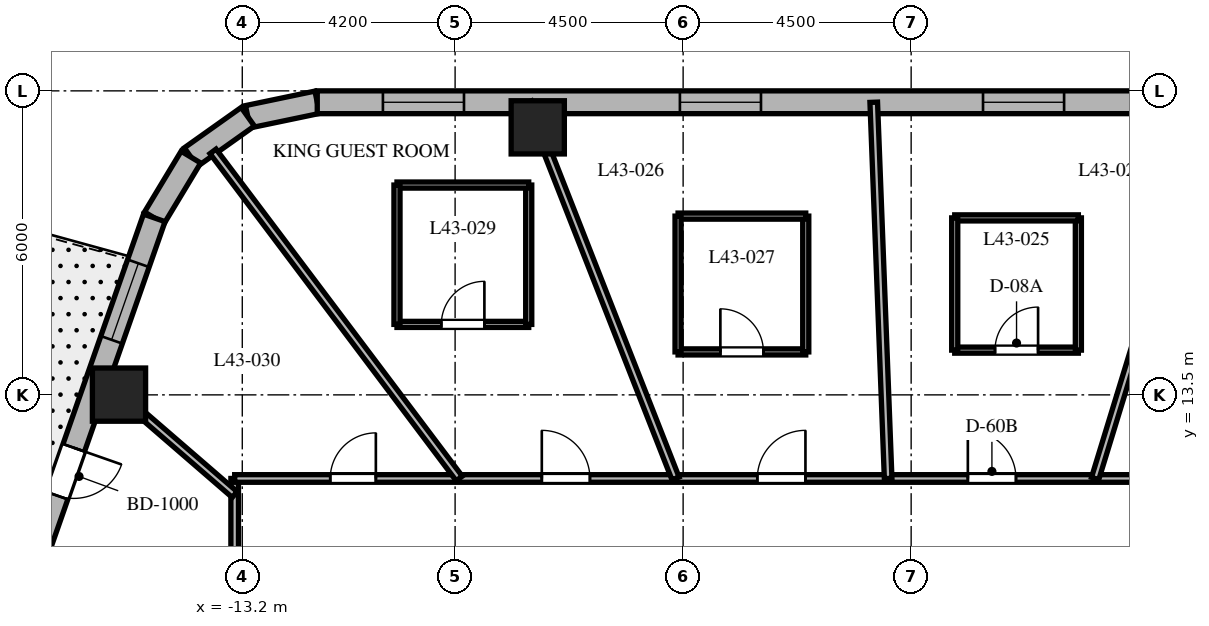
"""IFC4 building model, lengths in metres.
Left out: names, types, materials, properties, quantities, classifications, styles, units other than length and angle.
Written with IfcOpenShell. Run it as: python <this file> out.ifc"""

import sys

from ifc_helpers import new_model, si_unit, direction, frame, frame_2d, origin, origin_2d, place, context, subcontext, project, spatial, rectangle, extrude, element, fill, save


model = new_model("IFC4")
c1 = context("Model", 3, precision=1e-05, world=origin(), true_north=direction((0.0, 1.0)))
c2 = subcontext(c1, "Body", "Model", "MODEL_VIEW")
j1 = project(units=[si_unit("LENGTHUNIT", "METRE"), si_unit("PLANEANGLEUNIT", "RADIAN")], contexts=[c1])
p1 = place(None, origin())
s1 = spatial("IfcSite", under=j1, at=p1, CompositionType="ELEMENT")
p2 = place(p1, origin())
s2 = spatial("IfcBuilding", under=s1, at=p2, CompositionType="ELEMENT")
p3 = place(p2, frame((0.0, 0.0, 175.6)))
s3 = spatial("IfcBuildingStorey", under=s2, at=p3, CompositionType="ELEMENT", Elevation=175.6)
for number, where, z_axis, x_axis in (
    (1, (-7.369, 18.78, 0.0), (0.0, 0.0, 1.0), (1.0, 0.0, 0.0)),
    (2, (-15.633, 13.505, 0.0), (0.0, 0.0, 1.0), (1.0, 0.0, 0.0)),
):
    element("IfcColumn", number, at=place(p3, frame(where, z_axis=z_axis, x_axis=x_axis)), inside=s3, PredefinedType="COLUMN", context=c2, shape_type="SweptSolid", body=[
        extrude(rectangle(XDim=1.05, YDim=1.05, at=origin_2d()), origin(), (0.0, 0.0, 1.0), 3.7),
    ])
p4 = place(p3, frame((-11.72, 19.275, 0.0), z_axis=(0.0, 0.0, 1.0), x_axis=(-0.97893106758, -0.204191001093, 0.0)))
e3 = element("IfcWall", 3, at=p4, inside=s3, PredefinedType="SOLIDWALL", context=c2, shape_type="SweptSolid", body=[
    extrude(rectangle(XDim=1.4, YDim=0.45, at=frame_2d((0.7, 0.0))), origin(), (0.0, 0.0, 1.0), 3.4),
])
p5 = place(p3, frame((-13.091, 18.989, 0.0), z_axis=(0.0, 0.0, 1.0), x_axis=(-0.815574637848, -0.578651890258, 0.0)))
e4 = element("IfcWall", 4, at=p5, inside=s3, PredefinedType="SOLIDWALL", context=c2, shape_type="SweptSolid", body=[
    extrude(rectangle(XDim=1.377, YDim=0.45, at=frame_2d((0.688, 0.0))), origin(), (0.0, 0.0, 1.0), 3.4),
])
p6 = place(p3, frame((-14.214, 18.192, 0.0), z_axis=(0.0, 0.0, 1.0), x_axis=(-0.516340945502, -0.856383108193, 0.0)))
e5 = element("IfcWall", 5, at=p6, inside=s3, PredefinedType="SOLIDWALL", context=c2, shape_type="SweptSolid", body=[
    extrude(rectangle(XDim=1.4, YDim=0.45, at=frame_2d((0.7, 0.0))), origin(), (0.0, 0.0, 1.0), 3.4),
])
p7 = place(p3, frame((10.108, 19.275, 0.0), z_axis=(0.0, 0.0, 1.0), x_axis=(-1.0, 0.0, 0.0)))
e6 = element("IfcWall", 6, at=p7, inside=s3, PredefinedType="SOLIDWALL", context=c2, shape_type="SweptSolid", body=[
    extrude(rectangle(XDim=21.829, YDim=0.45, at=frame_2d((10.915, 0.0))), origin(), (0.0, 0.0, 1.0), 3.4),
])
p8 = place(p7, frame((1.297, 0.0, 0.8)))
e7 = element("IfcOpeningElement", 7, at=p8, cuts=e6, PredefinedType="OPENING", context=c2, shape_type="SweptSolid", body=[
    extrude(rectangle(XDim=1.6, YDim=1.75, at=frame_2d((0.8, 0.875))), frame((0.0, 0.235, 0.0), z_axis=(0.0, -1.0, 0.0), x_axis=(1.0, 0.0, 0.0)), (0.0, 0.0, 1.0), 0.47),
])
p9 = place(p7, frame((7.09, 0.0, 0.8)))
e8 = element("IfcOpeningElement", 8, at=p9, cuts=e6, PredefinedType="OPENING", context=c2, shape_type="SweptSolid", body=[
    extrude(rectangle(XDim=1.6, YDim=1.75, at=frame_2d((0.8, 0.875))), frame((0.0, 0.235, 0.0), z_axis=(0.0, -1.0, 0.0), x_axis=(1.0, 0.0, 0.0)), (0.0, 0.0, 1.0), 0.47),
])
p10 = place(p7, frame((13.072, 0.0, 0.8)))
e9 = element("IfcOpeningElement", 9, at=p10, cuts=e6, PredefinedType="OPENING", context=c2, shape_type="SweptSolid", body=[
    extrude(rectangle(XDim=1.6, YDim=1.75, at=frame_2d((0.8, 0.875))), frame((0.0, 0.235, 0.0), z_axis=(0.0, -1.0, 0.0), x_axis=(1.0, 0.0, 0.0)), (0.0, 0.0, 1.0), 0.47),
])
p11 = place(p7, frame((18.933, 0.0, 0.8)))
e10 = element("IfcOpeningElement", 10, at=p11, cuts=e6, PredefinedType="OPENING", context=c2, shape_type="SweptSolid", body=[
    extrude(rectangle(XDim=1.6, YDim=1.75, at=frame_2d((0.8, 0.875))), frame((0.0, 0.235, 0.0), z_axis=(0.0, -1.0, 0.0), x_axis=(1.0, 0.0, 0.0)), (0.0, 0.0, 1.0), 0.47),
])
p12 = place(p3, frame((-14.937, 16.993, 0.0), z_axis=(0.0, 0.0, 1.0), x_axis=(-0.330431575061, -0.943829949834, 0.0)))
e11 = element("IfcWall", 11, at=p12, inside=s3, PredefinedType="SOLIDWALL", context=c2, shape_type="SweptSolid", body=[
    extrude(rectangle(XDim=17.689, YDim=0.45, at=frame_2d((8.844, 0.0))), origin(), (0.0, 0.0, 1.0), 3.4),
])
p13 = place(p12, frame((4.807, 0.0, 0.0)))
e12 = element("IfcOpeningElement", 12, at=p13, cuts=e11, PredefinedType="OPENING", context=c2, shape_type="SweptSolid", body=[
    extrude(rectangle(XDim=1.0, YDim=2.15, at=frame_2d((0.5, 1.075))), frame((0.0, 0.235, 0.0), z_axis=(0.0, -1.0, 0.0), x_axis=(1.0, 0.0, 0.0)), (0.0, 0.0, 1.0), 0.47),
])
p14 = place(p12, frame((0.95, 0.0, 0.8)))
e13 = element("IfcOpeningElement", 13, at=p14, cuts=e11, PredefinedType="OPENING", context=c2, shape_type="SweptSolid", body=[
    extrude(rectangle(XDim=1.6, YDim=1.75, at=frame_2d((0.8, 0.875))), frame((0.0, 0.235, 0.0), z_axis=(0.0, -1.0, 0.0), x_axis=(1.0, 0.0, 0.0)), (0.0, 0.0, 1.0), 0.47),
])
p15 = place(p12, frame((7.99, 0.0, 0.8)))
e14 = element("IfcOpeningElement", 14, at=p15, cuts=e11, PredefinedType="OPENING", context=c2, shape_type="SweptSolid", body=[
    extrude(rectangle(XDim=1.6, YDim=1.75, at=frame_2d((0.8, 0.875))), frame((0.0, 0.235, 0.0), z_axis=(0.0, -1.0, 0.0), x_axis=(1.0, 0.0, 0.0)), (0.0, 0.0, 1.0), 0.47),
])
p16 = place(p12, frame((15.084, 0.0, 0.8)))
e15 = element("IfcOpeningElement", 15, at=p16, cuts=e11, PredefinedType="OPENING", context=c2, shape_type="SweptSolid", body=[
    extrude(rectangle(XDim=1.6, YDim=1.75, at=frame_2d((0.8, 0.875))), frame((0.0, 0.235, 0.0), z_axis=(0.0, -1.0, 0.0), x_axis=(1.0, 0.0, 0.0)), (0.0, 0.0, 1.0), 0.47),
])
p17 = place(p3, frame((-13.35, -11.85, 0.0), z_axis=(0.0, 0.0, 1.0), x_axis=(0.0, 1.0, 0.0)))
e16 = element("IfcWall", 16, at=p17, inside=s3, PredefinedType="PARTITIONING", context=c2, shape_type="SweptSolid", body=[
    extrude(rectangle(XDim=23.7, YDim=0.15, at=frame_2d((11.85, 0.0))), origin(), (0.0, 0.0, 1.0), 2.84),
])
p18 = place(p17, frame((18.389, 0.0, 0.0)))
e17 = element("IfcOpeningElement", 17, at=p18, cuts=e16, PredefinedType="OPENING", context=c2, shape_type="SweptSolid", body=[
    extrude(rectangle(XDim=0.95, YDim=2.03, at=frame_2d((0.475, 1.015))), frame((0.0, 0.085, 0.0), z_axis=(0.0, -1.0, 0.0), x_axis=(1.0, 0.0, 0.0)), (0.0, 0.0, 1.0), 0.17),
])
p19 = place(p17, frame((12.315, 0.0, 0.0)))
e18 = element("IfcOpeningElement", 18, at=p19, cuts=e16, PredefinedType="OPENING", context=c2, shape_type="SweptSolid", body=[
    extrude(rectangle(XDim=0.9, YDim=2.03, at=frame_2d((0.45, 1.015))), frame((0.0, 0.085, 0.0), z_axis=(0.0, -1.0, 0.0), x_axis=(1.0, 0.0, 0.0)), (0.0, 0.0, 1.0), 0.17),
])
p20 = place(p17, frame((9.27, 0.0, 0.0)))
e19 = element("IfcOpeningElement", 19, at=p20, cuts=e16, PredefinedType="OPENING", context=c2, shape_type="SweptSolid", body=[
    extrude(rectangle(XDim=0.9, YDim=2.03, at=frame_2d((0.45, 1.015))), frame((0.0, 0.085, 0.0), z_axis=(0.0, -1.0, 0.0), x_axis=(1.0, 0.0, 0.0)), (0.0, 0.0, 1.0), 0.17),
])
p21 = place(p17, frame((3.765, 0.0, 0.0)))
e20 = element("IfcOpeningElement", 20, at=p21, cuts=e16, PredefinedType="OPENING", context=c2, shape_type="SweptSolid", body=[
    extrude(rectangle(XDim=0.9, YDim=2.03, at=frame_2d((0.45, 1.015))), frame((0.0, 0.085, 0.0), z_axis=(0.0, -1.0, 0.0), x_axis=(1.0, 0.0, 0.0)), (0.0, 0.0, 1.0), 0.17),
])
p22 = place(p3, frame((-13.35, 11.85, 0.0), z_axis=(0.0, 0.0, 1.0), x_axis=(1.0, 0.0, 0.0)))
e21 = element("IfcWall", 21, at=p22, inside=s3, PredefinedType="PARTITIONING", context=c2, shape_type="SweptSolid", body=[
    extrude(rectangle(XDim=26.7, YDim=0.15, at=frame_2d((13.35, 0.0))), origin(), (0.0, 0.0, 1.0), 2.84),
])
p23 = place(p22, frame((22.7, 0.0, 0.0)))
e22 = element("IfcOpeningElement", 22, at=p23, cuts=e21, PredefinedType="OPENING", context=c2, shape_type="SweptSolid", body=[
    extrude(rectangle(XDim=0.9, YDim=2.03, at=frame_2d((0.45, 1.015))), frame((0.0, 0.085, 0.0), z_axis=(0.0, -1.0, 0.0), x_axis=(1.0, 0.0, 0.0)), (0.0, 0.0, 1.0), 0.17),
])
p24 = place(p22, frame((18.523, 0.0, 0.0)))
e23 = element("IfcOpeningElement", 23, at=p24, cuts=e21, PredefinedType="OPENING", context=c2, shape_type="SweptSolid", body=[
    extrude(rectangle(XDim=0.95, YDim=2.03, at=frame_2d((0.475, 1.015))), frame((0.0, 0.085, 0.0), z_axis=(0.0, -1.0, 0.0), x_axis=(1.0, 0.0, 0.0)), (0.0, 0.0, 1.0), 0.17),
])
p25 = place(p22, frame((14.469, 0.0, 0.0)))
e24 = element("IfcOpeningElement", 24, at=p25, cuts=e21, PredefinedType="OPENING", context=c2, shape_type="SweptSolid", body=[
    extrude(rectangle(XDim=0.95, YDim=2.03, at=frame_2d((0.475, 1.015))), frame((0.0, 0.085, 0.0), z_axis=(0.0, -1.0, 0.0), x_axis=(1.0, 0.0, 0.0)), (0.0, 0.0, 1.0), 0.17),
])
p26 = place(p22, frame((10.314, 0.0, 0.0)))
e25 = element("IfcOpeningElement", 25, at=p26, cuts=e21, PredefinedType="OPENING", context=c2, shape_type="SweptSolid", body=[
    extrude(rectangle(XDim=0.95, YDim=2.03, at=frame_2d((0.475, 1.015))), frame((0.0, 0.085, 0.0), z_axis=(0.0, -1.0, 0.0), x_axis=(1.0, 0.0, 0.0)), (0.0, 0.0, 1.0), 0.17),
])
p27 = place(p22, frame((6.061, 0.0, 0.0)))
e26 = element("IfcOpeningElement", 26, at=p27, cuts=e21, PredefinedType="OPENING", context=c2, shape_type="SweptSolid", body=[
    extrude(rectangle(XDim=0.95, YDim=2.03, at=frame_2d((0.475, 1.015))), frame((0.0, 0.085, 0.0), z_axis=(0.0, -1.0, 0.0), x_axis=(1.0, 0.0, 0.0)), (0.0, 0.0, 1.0), 0.17),
])
p28 = place(p22, frame((1.886, 0.0, 0.0)))
e27 = element("IfcOpeningElement", 27, at=p28, cuts=e21, PredefinedType="OPENING", context=c2, shape_type="SweptSolid", body=[
    extrude(rectangle(XDim=0.9, YDim=2.03, at=frame_2d((0.45, 1.015))), frame((0.0, 0.085, 0.0), z_axis=(0.0, -1.0, 0.0), x_axis=(1.0, 0.0, 0.0)), (0.0, 0.0, 1.0), 0.17),
])
p29 = place(p3, frame((3.631, 11.85, 0.0), z_axis=(0.0, 0.0, 1.0), x_axis=(0.293007573338, 0.956110120209, 0.0)))
e28 = element("IfcWall", 28, at=p29, inside=s3, PredefinedType="PARTITIONING", context=c2, shape_type="SweptSolid", body=[
    extrude(rectangle(XDim=7.766, YDim=0.15, at=frame_2d((3.883, 0.0))), origin(), (0.0, 0.0, 1.0), 2.64),
])
p30 = place(p3, frame((-0.454, 11.85, 0.0), z_axis=(0.0, 0.0, 1.0), x_axis=(-0.038279171143, 0.999267083945, 0.0)))
e29 = element("IfcWall", 29, at=p30, inside=s3, PredefinedType="PARTITIONING", context=c2, shape_type="SweptSolid", body=[
    extrude(rectangle(XDim=7.43, YDim=0.15, at=frame_2d((3.715, 0.0))), origin(), (0.0, 0.0, 1.0), 2.64),
])
p31 = place(p3, frame((-4.65, 11.85, 0.0), z_axis=(0.0, 0.0, 1.0), x_axis=(-0.365265947993, 0.930903210456, 0.0)))
e30 = element("IfcWall", 30, at=p31, inside=s3, PredefinedType="PARTITIONING", context=c2, shape_type="SweptSolid", body=[
    extrude(rectangle(XDim=7.976, YDim=0.15, at=frame_2d((3.988, 0.0))), origin(), (0.0, 0.0, 1.0), 2.64),
])
p32 = place(p3, frame((-8.918, 11.85, 0.0), z_axis=(0.0, 0.0, 1.0), x_axis=(-0.601347965064, 0.798987249531, 0.0)))
e31 = element("IfcWall", 31, at=p32, inside=s3, PredefinedType="PARTITIONING", context=c2, shape_type="SweptSolid", body=[
    extrude(rectangle(XDim=8.08, YDim=0.15, at=frame_2d((4.04, 0.0))), origin(), (0.0, 0.0, 1.0), 2.64),
])
p33 = place(p3, frame((-13.35, 11.533, 0.0), z_axis=(0.0, 0.0, 1.0), x_axis=(-0.756711647314, 0.65374879183, 0.0)))
e32 = element("IfcWall", 32, at=p33, inside=s3, PredefinedType="PARTITIONING", context=c2, shape_type="SweptSolid", body=[
    extrude(rectangle(XDim=3.55, YDim=0.15, at=frame_2d((1.775, 0.0))), origin(), (0.0, 0.0, 1.0), 2.64),
])
p34 = place(p3, frame((0.86, 14.383, 0.0), z_axis=(0.0, 0.0, 1.0), x_axis=(1.0, 0.0, 0.0)))
e33 = element("IfcWall", 33, at=p34, inside=s3, PredefinedType="PARTITIONING", context=c2, shape_type="SweptSolid", body=[
    extrude(rectangle(XDim=2.44, YDim=0.12, at=frame_2d((1.22, 0.0))), origin(), (0.0, 0.0, 1.0), 3.4),
])
p35 = place(p34, frame((0.795, 0.0, 0.0)))
e34 = element("IfcOpeningElement", 34, at=p35, cuts=e33, PredefinedType="OPENING", context=c2, shape_type="SweptSolid", body=[
    extrude(rectangle(XDim=0.85, YDim=2.03, at=frame_2d((0.425, 1.015))), frame((0.0, 0.07, 0.0), z_axis=(0.0, -1.0, 0.0), x_axis=(1.0, 0.0, 0.0)), (0.0, 0.0, 1.0), 0.14),
])
p36 = place(p3, frame((3.3, 14.383, 0.0), z_axis=(0.0, 0.0, 1.0), x_axis=(0.0, 1.0, 0.0)))
e35 = element("IfcWall", 35, at=p36, inside=s3, PredefinedType="PARTITIONING", context=c2, shape_type="SweptSolid", body=[
    extrude(rectangle(XDim=2.61, YDim=0.12, at=frame_2d((1.305, 0.0))), origin(), (0.0, 0.0, 1.0), 2.84),
])
p37 = place(p3, frame((3.3, 16.993, 0.0), z_axis=(0.0, 0.0, 1.0), x_axis=(-1.0, 0.0, 0.0)))
e36 = element("IfcWall", 36, at=p37, inside=s3, PredefinedType="PARTITIONING", context=c2, shape_type="SweptSolid", body=[
    extrude(rectangle(XDim=2.44, YDim=0.12, at=frame_2d((1.22, 0.0))), origin(), (0.0, 0.0, 1.0), 3.4),
])
p38 = place(p3, frame((0.86, 16.993, 0.0), z_axis=(0.0, 0.0, 1.0), x_axis=(0.0, -1.0, 0.0)))
e37 = element("IfcWall", 37, at=p38, inside=s3, PredefinedType="PARTITIONING", context=c2, shape_type="SweptSolid", body=[
    extrude(rectangle(XDim=2.61, YDim=0.12, at=frame_2d((1.305, 0.0))), origin(), (0.0, 0.0, 1.0), 2.84),
])
p39 = place(p3, frame((-4.6, 14.348, 0.0), z_axis=(0.0, 0.0, 1.0), x_axis=(1.0, 0.0, 0.0)))
e38 = element("IfcWall", 38, at=p39, inside=s3, PredefinedType="PARTITIONING", context=c2, shape_type="SweptSolid", body=[
    extrude(rectangle(XDim=2.52, YDim=0.12, at=frame_2d((1.26, 0.0))), origin(), (0.0, 0.0, 1.0), 3.4),
])
p40 = place(p39, frame((0.835, 0.0, 0.0)))
e39 = element("IfcOpeningElement", 39, at=p40, cuts=e38, PredefinedType="OPENING", context=c2, shape_type="SweptSolid", body=[
    extrude(rectangle(XDim=0.85, YDim=2.03, at=frame_2d((0.425, 1.015))), frame((0.0, 0.07, 0.0), z_axis=(0.0, -1.0, 0.0), x_axis=(1.0, 0.0, 0.0)), (0.0, 0.0, 1.0), 0.14),
])
p41 = place(p3, frame((-2.08, 14.348, 0.0), z_axis=(0.0, 0.0, 1.0), x_axis=(0.0, 1.0, 0.0)))
e40 = element("IfcWall", 40, at=p41, inside=s3, PredefinedType="PARTITIONING", context=c2, shape_type="SweptSolid", body=[
    extrude(rectangle(XDim=2.68, YDim=0.12, at=frame_2d((1.34, 0.0))), origin(), (0.0, 0.0, 1.0), 2.84),
])
p42 = place(p3, frame((-2.08, 17.028, 0.0), z_axis=(0.0, 0.0, 1.0), x_axis=(-1.0, 0.0, 0.0)))
e41 = element("IfcWall", 41, at=p42, inside=s3, PredefinedType="PARTITIONING", context=c2, shape_type="SweptSolid", body=[
    extrude(rectangle(XDim=2.52, YDim=0.12, at=frame_2d((1.26, 0.0))), origin(), (0.0, 0.0, 1.0), 3.4),
])
p43 = place(p3, frame((-4.6, 17.028, 0.0), z_axis=(0.0, 0.0, 1.0), x_axis=(0.0, -1.0, 0.0)))
e42 = element("IfcWall", 42, at=p43, inside=s3, PredefinedType="PARTITIONING", context=c2, shape_type="SweptSolid", body=[
    extrude(rectangle(XDim=2.68, YDim=0.12, at=frame_2d((1.34, 0.0))), origin(), (0.0, 0.0, 1.0), 2.84),
])
p44 = place(p3, frame((-10.147, 14.891, 0.0), z_axis=(0.0, 0.0, 1.0), x_axis=(1.0, 0.0, 0.0)))
e43 = element("IfcWall", 43, at=p44, inside=s3, PredefinedType="PARTITIONING", context=c2, shape_type="SweptSolid", body=[
    extrude(rectangle(XDim=2.6, YDim=0.12, at=frame_2d((1.3, 0.0))), origin(), (0.0, 0.0, 1.0), 2.84),
])
p45 = place(p44, frame((0.875, 0.0, 0.0)))
e44 = element("IfcOpeningElement", 44, at=p45, cuts=e43, PredefinedType="OPENING", context=c2, shape_type="SweptSolid", body=[
    extrude(rectangle(XDim=0.85, YDim=2.03, at=frame_2d((0.425, 1.015))), frame((0.0, 0.07, 0.0), z_axis=(0.0, -1.0, 0.0), x_axis=(1.0, 0.0, 0.0)), (0.0, 0.0, 1.0), 0.14),
])
p46 = place(p3, frame((-7.547, 14.891, 0.0), z_axis=(0.0, 0.0, 1.0), x_axis=(0.0, 1.0, 0.0)))
e45 = element("IfcWall", 45, at=p46, inside=s3, PredefinedType="PARTITIONING", context=c2, shape_type="SweptSolid", body=[
    extrude(rectangle(XDim=2.75, YDim=0.12, at=frame_2d((1.375, 0.0))), origin(), (0.0, 0.0, 1.0), 2.84),
])
p47 = place(p3, frame((-7.547, 17.641, 0.0), z_axis=(0.0, 0.0, 1.0), x_axis=(-1.0, 0.0, 0.0)))
e46 = element("IfcWall", 46, at=p47, inside=s3, PredefinedType="PARTITIONING", context=c2, shape_type="SweptSolid", body=[
    extrude(rectangle(XDim=2.6, YDim=0.12, at=frame_2d((1.3, 0.0))), origin(), (0.0, 0.0, 1.0), 2.64),
])
p48 = place(p3, frame((-10.147, 17.641, 0.0), z_axis=(0.0, 0.0, 1.0), x_axis=(0.0, -1.0, 0.0)))
e47 = element("IfcWall", 47, at=p48, inside=s3, PredefinedType="PARTITIONING", context=c2, shape_type="SweptSolid", body=[
    extrude(rectangle(XDim=2.75, YDim=0.12, at=frame_2d((1.375, 0.0))), origin(), (0.0, 0.0, 1.0), 2.64),
])
p49 = place(p9, origin())
e48 = element("IfcWindow", 48, at=p49, inside=s3, PartitioningType="SINGLE_PANEL", PredefinedType="WINDOW", context=c2, shape_type="SweptSolid", body=[
    extrude(rectangle(XDim=1.6, YDim=1.75, at=frame_2d((0.8, 0.875))), frame((0.0, 0.03, 0.0), z_axis=(0.0, -1.0, 0.0), x_axis=(1.0, 0.0, 0.0)), (0.0, 0.0, 1.0), 0.06),
])
fill(e8, e48)
p50 = place(p10, origin())
e49 = element("IfcWindow", 49, at=p50, inside=s3, PartitioningType="SINGLE_PANEL", PredefinedType="WINDOW", context=c2, shape_type="SweptSolid", body=[
    extrude(rectangle(XDim=1.6, YDim=1.75, at=frame_2d((0.8, 0.875))), frame((0.0, 0.03, 0.0), z_axis=(0.0, -1.0, 0.0), x_axis=(1.0, 0.0, 0.0)), (0.0, 0.0, 1.0), 0.06),
])
fill(e9, e49)
p51 = place(p11, origin())
e50 = element("IfcWindow", 50, at=p51, inside=s3, PartitioningType="SINGLE_PANEL", PredefinedType="WINDOW", context=c2, shape_type="SweptSolid", body=[
    extrude(rectangle(XDim=1.6, YDim=1.75, at=frame_2d((0.8, 0.875))), frame((0.0, 0.03, 0.0), z_axis=(0.0, -1.0, 0.0), x_axis=(1.0, 0.0, 0.0)), (0.0, 0.0, 1.0), 0.06),
])
fill(e10, e50)
p52 = place(p13, origin())
e51 = element("IfcDoor", 51, at=p52, inside=s3, OperationType="SINGLE_SWING_LEFT", PredefinedType="DOOR", context=c2, shape_type="SweptSolid", body=[
    extrude(rectangle(XDim=1.0, YDim=2.15, at=frame_2d((0.5, 1.075))), frame((0.0, 0.025, 0.0), z_axis=(0.0, -1.0, 0.0), x_axis=(1.0, 0.0, 0.0)), (0.0, 0.0, 1.0), 0.05),
])
fill(e12, e51)
p53 = place(p14, origin())
e52 = element("IfcWindow", 52, at=p53, inside=s3, PartitioningType="SINGLE_PANEL", PredefinedType="WINDOW", context=c2, shape_type="SweptSolid", body=[
    extrude(rectangle(XDim=1.6, YDim=1.75, at=frame_2d((0.8, 0.875))), frame((0.0, 0.03, 0.0), z_axis=(0.0, -1.0, 0.0), x_axis=(1.0, 0.0, 0.0)), (0.0, 0.0, 1.0), 0.06),
])
fill(e13, e52)
p54 = place(p25, origin())
e53 = element("IfcDoor", 53, at=p54, inside=s3, OperationType="SINGLE_SWING_LEFT", PredefinedType="DOOR", context=c2, shape_type="SweptSolid", body=[
    extrude(rectangle(XDim=0.95, YDim=2.03, at=frame_2d((0.475, 1.015))), frame((0.0, 0.025, 0.0), z_axis=(0.0, -1.0, 0.0), x_axis=(1.0, 0.0, 0.0)), (0.0, 0.0, 1.0), 0.05),
])
fill(e24, e53)
p55 = place(p35, origin())
e54 = element("IfcDoor", 54, at=p55, inside=s3, OperationType="SINGLE_SWING_RIGHT", PredefinedType="DOOR", context=c2, shape_type="SweptSolid", body=[
    extrude(rectangle(XDim=0.85, YDim=2.03, at=frame_2d((0.425, 1.015))), frame((0.0, 0.025, 0.0), z_axis=(0.0, -1.0, 0.0), x_axis=(1.0, 0.0, 0.0)), (0.0, 0.0, 1.0), 0.05),
])
fill(e34, e54)
p56 = place(p26, origin())
e55 = element("IfcDoor", 55, at=p56, inside=s3, OperationType="SINGLE_SWING_RIGHT", PredefinedType="DOOR", context=c2, shape_type="SweptSolid", body=[
    extrude(rectangle(XDim=0.95, YDim=2.03, at=frame_2d((0.475, 1.015))), frame((0.0, 0.025, 0.0), z_axis=(0.0, -1.0, 0.0), x_axis=(1.0, 0.0, 0.0)), (0.0, 0.0, 1.0), 0.05),
])
fill(e25, e55)
p57 = place(p40, origin())
e56 = element("IfcDoor", 56, at=p57, inside=s3, OperationType="SINGLE_SWING_LEFT", PredefinedType="DOOR", context=c2, shape_type="SweptSolid", body=[
    extrude(rectangle(XDim=0.85, YDim=2.03, at=frame_2d((0.425, 1.015))), frame((0.0, 0.025, 0.0), z_axis=(0.0, -1.0, 0.0), x_axis=(1.0, 0.0, 0.0)), (0.0, 0.0, 1.0), 0.05),
])
fill(e39, e56)
p58 = place(p27, origin())
e57 = element("IfcDoor", 57, at=p58, inside=s3, OperationType="SINGLE_SWING_LEFT", PredefinedType="DOOR", context=c2, shape_type="SweptSolid", body=[
    extrude(rectangle(XDim=0.95, YDim=2.03, at=frame_2d((0.475, 1.015))), frame((0.0, 0.025, 0.0), z_axis=(0.0, -1.0, 0.0), x_axis=(1.0, 0.0, 0.0)), (0.0, 0.0, 1.0), 0.05),
])
fill(e26, e57)
p59 = place(p45, origin())
e58 = element("IfcDoor", 58, at=p59, inside=s3, OperationType="SINGLE_SWING_RIGHT", PredefinedType="DOOR", context=c2, shape_type="SweptSolid", body=[
    extrude(rectangle(XDim=0.85, YDim=2.03, at=frame_2d((0.425, 1.015))), frame((0.0, 0.025, 0.0), z_axis=(0.0, -1.0, 0.0), x_axis=(1.0, 0.0, 0.0)), (0.0, 0.0, 1.0), 0.05),
])
fill(e44, e58)
p60 = place(p28, origin())
e59 = element("IfcDoor", 59, at=p60, inside=s3, OperationType="SINGLE_SWING_RIGHT", PredefinedType="DOOR", context=c2, shape_type="SweptSolid", body=[
    extrude(rectangle(XDim=0.9, YDim=2.03, at=frame_2d((0.45, 1.015))), frame((0.0, 0.025, 0.0), z_axis=(0.0, -1.0, 0.0), x_axis=(1.0, 0.0, 0.0)), (0.0, 0.0, 1.0), 0.05),
])
fill(e27, e59)
save(model, sys.argv[1])
